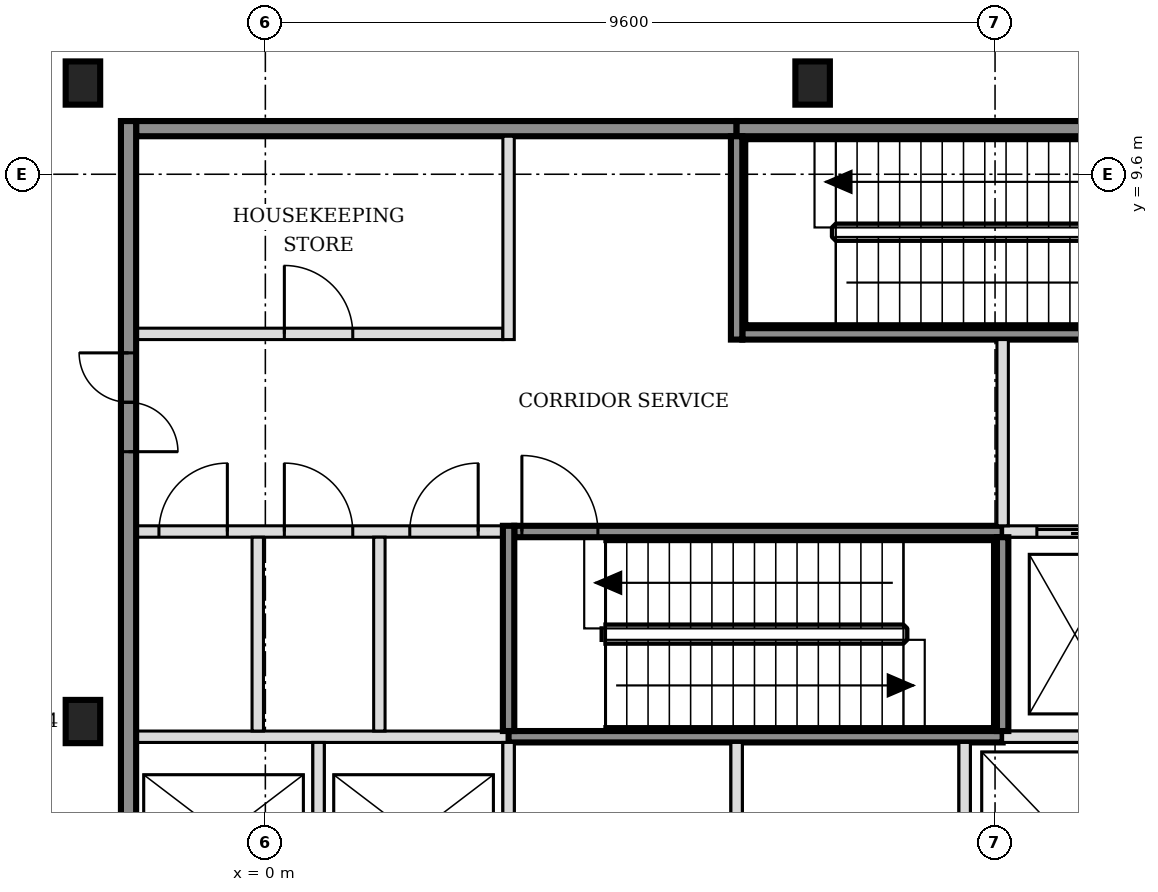
"""IFC4 building model, lengths in metres.
Left out: names, types, materials, properties, quantities, classifications, styles, units other than length and angle.
Written with IfcOpenShell. Run it as: python <this file> out.ifc"""

import sys

from ifc_helpers import new_model, si_unit, direction, frame, frame_2d, origin, origin_2d, place, context, subcontext, project, spatial, rectangle, i_section, extrude, element, fill, save


model = new_model("IFC4")
c1 = context("Model", 3, precision=1e-05, world=origin(), true_north=direction((0.0, 1.0)))
c2 = subcontext(c1, "Body", "Model", "MODEL_VIEW")
j1 = project(units=[si_unit("LENGTHUNIT", "METRE"), si_unit("PLANEANGLEUNIT", "RADIAN")], contexts=[c1])
p1 = place(None, origin())
s1 = spatial("IfcSite", under=j1, at=p1, CompositionType="ELEMENT")
p2 = place(p1, origin())
s2 = spatial("IfcBuilding", under=s1, at=p2, CompositionType="ELEMENT")
p3 = place(p2, frame((0.0, 0.0, 30.6)))
s3 = spatial("IfcBuildingStorey", under=s2, at=p3, CompositionType="ELEMENT", Elevation=30.6)
for number, where, z_axis, x_axis in (
    (1, (-2.4, 2.4, -0.2), (0.0, 0.0, 1.0), (1.0, 0.0, 0.0)),
    (2, (-2.4, 10.8, -0.2), (0.0, 0.0, 1.0), (1.0, 0.0, 0.0)),
    (3, (7.2, 10.8, -0.2), (0.0, 0.0, 1.0), (1.0, 0.0, 0.0)),
):
    element("IfcColumn", number, at=place(p3, frame(where, z_axis=z_axis, x_axis=x_axis)), inside=s3, PredefinedType="COLUMN", context=c2, shape_type="SweptSolid", body=[
        extrude(i_section(OverallWidth=0.454, OverallDepth=0.569, WebThickness=0.078, FlangeThickness=0.125, FilletRadius=0.015, at=origin_2d()), origin(), (0.0, 0.0, 1.0), 4.8),
    ])
p4 = place(p3, frame((-1.7, 2.2, 0.0), z_axis=(0.0, 0.0, 1.0), x_axis=(1.0, 0.0, 0.0)))
e4 = element("IfcWall", 4, at=p4, inside=s3, PredefinedType="SOLIDWALL", context=c2, shape_type="SweptSolid", body=[
    extrude(rectangle(XDim=4.9, YDim=0.15, at=frame_2d((2.45, 0.0))), origin(), (0.0, 0.0, 1.0), 4.6),
])
p5 = place(p3, frame((3.2, 2.2, 0.0), z_axis=(0.0, 0.0, 1.0), x_axis=(1.0, 0.0, 0.0)))
e5 = element("IfcWall", 5, at=p5, inside=s3, PredefinedType="SOLIDWALL", context=c2, shape_type="SweptSolid", body=[
    extrude(rectangle(XDim=6.5, YDim=0.15, at=frame_2d((3.25, 0.0))), origin(), (0.0, 0.0, 1.0), 4.6),
])
p6 = place(p3, frame((9.7, 2.2, 0.0), z_axis=(0.0, 0.0, 1.0), x_axis=(1.0, 0.0, 0.0)))
e6 = element("IfcWall", 6, at=p6, inside=s3, PredefinedType="SOLIDWALL", context=c2, shape_type="SweptSolid", body=[
    extrude(rectangle(XDim=4.525, YDim=0.15, at=frame_2d((2.263, 0.0))), origin(), (0.0, 0.0, 1.0), 4.6),
])
p7 = place(p3, frame((-1.7, 4.9, 0.0), z_axis=(0.0, 0.0, 1.0), x_axis=(1.0, 0.0, 0.0)))
e7 = element("IfcWall", 7, at=p7, inside=s3, PredefinedType="PARTITIONING", context=c2, shape_type="SweptSolid", body=[
    extrude(rectangle(XDim=4.825, YDim=0.15, at=frame_2d((2.413, 0.0))), origin(), (0.0, 0.0, 1.0), 4.6),
])
p8 = place(p7, frame((0.3, 0.0, 0.0)))
e8 = element("IfcOpeningElement", 8, at=p8, cuts=e7, PredefinedType="OPENING", context=c2, shape_type="SweptSolid", body=[
    extrude(rectangle(XDim=0.9, YDim=2.1, at=frame_2d((0.45, 1.05))), frame((0.0, 0.085, 0.0), z_axis=(0.0, -1.0, 0.0), x_axis=(1.0, 0.0, 0.0)), (0.0, 0.0, 1.0), 0.17),
])
p9 = place(p7, frame((1.95, 0.0, 0.0)))
e9 = element("IfcOpeningElement", 9, at=p9, cuts=e7, PredefinedType="OPENING", context=c2, shape_type="SweptSolid", body=[
    extrude(rectangle(XDim=0.9, YDim=2.1, at=frame_2d((0.45, 1.05))), frame((0.0, 0.085, 0.0), z_axis=(0.0, -1.0, 0.0), x_axis=(1.0, 0.0, 0.0)), (0.0, 0.0, 1.0), 0.17),
])
p10 = place(p7, frame((3.6, 0.0, 0.0)))
e10 = element("IfcOpeningElement", 10, at=p10, cuts=e7, PredefinedType="OPENING", context=c2, shape_type="SweptSolid", body=[
    extrude(rectangle(XDim=0.9, YDim=2.1, at=frame_2d((0.45, 1.05))), frame((0.0, 0.085, 0.0), z_axis=(0.0, -1.0, 0.0), x_axis=(1.0, 0.0, 0.0)), (0.0, 0.0, 1.0), 0.17),
])
p11 = place(p3, frame((3.275, 4.9, 0.0), z_axis=(0.0, 0.0, 1.0), x_axis=(1.0, 0.0, 0.0)))
e11 = element("IfcWall", 11, at=p11, inside=s3, PredefinedType="SOLIDWALL", context=c2, shape_type="SweptSolid", body=[
    extrude(rectangle(XDim=6.425, YDim=0.15, at=frame_2d((3.212, 0.0))), origin(), (0.0, 0.0, 1.0), 4.6),
])
p12 = place(p11, frame((0.1, 0.0, 0.0)))
e12 = element("IfcOpeningElement", 12, at=p12, cuts=e11, PredefinedType="OPENING", context=c2, shape_type="SweptSolid", body=[
    extrude(rectangle(XDim=1.0, YDim=2.1, at=frame_2d((0.5, 1.05))), frame((0.0, 0.085, 0.0), z_axis=(0.0, -1.0, 0.0), x_axis=(1.0, 0.0, 0.0)), (0.0, 0.0, 1.0), 0.17),
])
p13 = place(p3, frame((9.7, 4.9, 0.0), z_axis=(0.0, 0.0, 1.0), x_axis=(1.0, 0.0, 0.0)))
e13 = element("IfcWall", 13, at=p13, inside=s3, PredefinedType="SOLIDWALL", context=c2, shape_type="SweptSolid", body=[
    extrude(rectangle(XDim=6.4, YDim=0.15, at=frame_2d((3.2, 0.0))), origin(), (0.0, 0.0, 1.0), 4.6),
])
p14 = place(p13, frame((0.45, 0.0, 0.0)))
e14 = element("IfcOpeningElement", 14, at=p14, cuts=e13, PredefinedType="OPENING", context=c2, shape_type="SweptSolid", body=[
    extrude(rectangle(XDim=1.0, YDim=2.1, at=frame_2d((0.5, 1.05))), frame((0.0, 0.085, 0.0), z_axis=(0.0, -1.0, 0.0), x_axis=(1.0, 0.0, 0.0)), (0.0, 0.0, 1.0), 0.17),
])
p15 = place(p13, frame((2.35, 0.0, 0.0)))
e15 = element("IfcOpeningElement", 15, at=p15, cuts=e13, PredefinedType="OPENING", context=c2, shape_type="SweptSolid", body=[
    extrude(rectangle(XDim=1.0, YDim=2.1, at=frame_2d((0.5, 1.05))), frame((0.0, 0.085, 0.0), z_axis=(0.0, -1.0, 0.0), x_axis=(1.0, 0.0, 0.0)), (0.0, 0.0, 1.0), 0.17),
])
p16 = place(p13, frame((4.7, 0.0, 0.0)))
e16 = element("IfcOpeningElement", 16, at=p16, cuts=e13, PredefinedType="OPENING", context=c2, shape_type="SweptSolid", body=[
    extrude(rectangle(XDim=0.9, YDim=2.1, at=frame_2d((0.45, 1.05))), frame((0.0, 0.085, 0.0), z_axis=(0.0, -1.0, 0.0), x_axis=(1.0, 0.0, 0.0)), (0.0, 0.0, 1.0), 0.17),
])
p17 = place(p3, frame((-1.7, 7.5, 0.0), z_axis=(0.0, 0.0, 1.0), x_axis=(1.0, 0.0, 0.0)))
e17 = element("IfcWall", 17, at=p17, inside=s3, PredefinedType="PARTITIONING", context=c2, shape_type="SweptSolid", body=[
    extrude(rectangle(XDim=4.825, YDim=0.15, at=frame_2d((2.413, 0.0))), origin(), (0.0, 0.0, 1.0), 4.6),
])
p18 = place(p17, frame((1.95, 0.0, 0.0)))
e18 = element("IfcOpeningElement", 18, at=p18, cuts=e17, PredefinedType="OPENING", context=c2, shape_type="SweptSolid", body=[
    extrude(rectangle(XDim=0.9, YDim=2.1, at=frame_2d((0.45, 1.05))), frame((0.0, 0.085, 0.0), z_axis=(0.0, -1.0, 0.0), x_axis=(1.0, 0.0, 0.0)), (0.0, 0.0, 1.0), 0.17),
])
p19 = place(p3, frame((6.275, 7.5, 0.0), z_axis=(0.0, 0.0, 1.0), x_axis=(1.0, 0.0, 0.0)))
e19 = element("IfcWall", 19, at=p19, inside=s3, PredefinedType="SOLIDWALL", context=c2, shape_type="SweptSolid", body=[
    extrude(rectangle(XDim=6.425, YDim=0.15, at=frame_2d((3.212, 0.0))), origin(), (0.0, 0.0, 1.0), 4.6),
])
p20 = place(p19, frame((5.225, 0.0, 0.0)))
e20 = element("IfcOpeningElement", 20, at=p20, cuts=e19, PredefinedType="OPENING", context=c2, shape_type="SweptSolid", body=[
    extrude(rectangle(XDim=1.0, YDim=2.1, at=frame_2d((0.5, 1.05))), frame((0.0, 0.085, 0.0), z_axis=(0.0, -1.0, 0.0), x_axis=(1.0, 0.0, 0.0)), (0.0, 0.0, 1.0), 0.17),
])
p21 = place(p3, frame((-1.7, 10.2, 0.0), z_axis=(0.0, 0.0, 1.0), x_axis=(1.0, 0.0, 0.0)))
e21 = element("IfcWall", 21, at=p21, inside=s3, PredefinedType="SOLIDWALL", context=c2, shape_type="SweptSolid", body=[
    extrude(rectangle(XDim=7.9, YDim=0.2, at=frame_2d((3.95, 0.0))), origin(), (0.0, 0.0, 1.0), 4.6),
])
p22 = place(p3, frame((6.2, 10.2, 0.0), z_axis=(0.0, 0.0, 1.0), x_axis=(1.0, 0.0, 0.0)))
e22 = element("IfcWall", 22, at=p22, inside=s3, PredefinedType="SOLIDWALL", context=c2, shape_type="SweptSolid", body=[
    extrude(rectangle(XDim=6.5, YDim=0.2, at=frame_2d((3.25, 0.0))), origin(), (0.0, 0.0, 1.0), 4.6),
])
p23 = place(p3, frame((-1.8, -5.5, 0.0), z_axis=(0.0, 0.0, 1.0), x_axis=(0.0, 1.0, 0.0)))
e23 = element("IfcWall", 23, at=p23, inside=s3, PredefinedType="SOLIDWALL", context=c2, shape_type="SweptSolid", body=[
    extrude(rectangle(XDim=15.8, YDim=0.2, at=frame_2d((7.9, 0.0))), origin(), (0.0, 0.0, 1.0), 4.6),
])
p24 = place(p23, frame((3.05, 0.0, 0.0)))
e24 = element("IfcOpeningElement", 24, at=p24, cuts=e23, PredefinedType="OPENING", context=c2, shape_type="SweptSolid", body=[
    extrude(rectangle(XDim=1.3, YDim=2.1, at=frame_2d((0.65, 1.05))), frame((0.0, 0.11, 0.0), z_axis=(0.0, -1.0, 0.0), x_axis=(1.0, 0.0, 0.0)), (0.0, 0.0, 1.0), 0.22),
])
p25 = place(p23, frame((11.45, 0.0, 0.0)))
e25 = element("IfcOpeningElement", 25, at=p25, cuts=e23, PredefinedType="OPENING", context=c2, shape_type="SweptSolid", body=[
    extrude(rectangle(XDim=1.3, YDim=2.1, at=frame_2d((0.65, 1.05))), frame((0.0, 0.11, 0.0), z_axis=(0.0, -1.0, 0.0), x_axis=(1.0, 0.0, 0.0)), (0.0, 0.0, 1.0), 0.22),
])
p26 = place(p3, frame((-0.1, 2.275, 0.0), z_axis=(0.0, 0.0, 1.0), x_axis=(0.0, 1.0, 0.0)))
e26 = element("IfcWall", 26, at=p26, inside=s3, PredefinedType="PARTITIONING", context=c2, shape_type="SweptSolid", body=[
    extrude(rectangle(XDim=2.55, YDim=0.15, at=frame_2d((1.275, 0.0))), origin(), (0.0, 0.0, 1.0), 4.6),
])
p27 = place(p3, frame((0.7, -0.325, 0.0), z_axis=(0.0, 0.0, 1.0), x_axis=(0.0, 1.0, 0.0)))
e27 = element("IfcWall", 27, at=p27, inside=s3, PredefinedType="SOLIDWALL", context=c2, shape_type="SweptSolid", body=[
    extrude(rectangle(XDim=2.45, YDim=0.15, at=frame_2d((1.225, 0.0))), origin(), (0.0, 0.0, 1.0), 4.6),
])
p28 = place(p3, frame((1.5, 2.275, 0.0), z_axis=(0.0, 0.0, 1.0), x_axis=(0.0, 1.0, 0.0)))
e28 = element("IfcWall", 28, at=p28, inside=s3, PredefinedType="PARTITIONING", context=c2, shape_type="SweptSolid", body=[
    extrude(rectangle(XDim=2.55, YDim=0.15, at=frame_2d((1.275, 0.0))), origin(), (0.0, 0.0, 1.0), 4.6),
])
p29 = place(p3, frame((3.2, -0.325, 0.0), z_axis=(0.0, 0.0, 1.0), x_axis=(0.0, 1.0, 0.0)))
e29 = element("IfcWall", 29, at=p29, inside=s3, PredefinedType="SOLIDWALL", context=c2, shape_type="SweptSolid", body=[
    extrude(rectangle(XDim=2.45, YDim=0.15, at=frame_2d((1.225, 0.0))), origin(), (0.0, 0.0, 1.0), 4.6),
])
p30 = place(p3, frame((3.2, 2.275, 0.0), z_axis=(0.0, 0.0, 1.0), x_axis=(0.0, 1.0, 0.0)))
e30 = element("IfcWall", 30, at=p30, inside=s3, PredefinedType="SOLIDWALL", context=c2, shape_type="SweptSolid", body=[
    extrude(rectangle(XDim=2.7, YDim=0.15, at=frame_2d((1.35, 0.0))), origin(), (0.0, 0.0, 1.0), 4.6),
])
p31 = place(p3, frame((3.2, 7.425, 0.0), z_axis=(0.0, 0.0, 1.0), x_axis=(0.0, 1.0, 0.0)))
e31 = element("IfcWall", 31, at=p31, inside=s3, PredefinedType="PARTITIONING", context=c2, shape_type="SweptSolid", body=[
    extrude(rectangle(XDim=2.675, YDim=0.15, at=frame_2d((1.337, 0.0))), origin(), (0.0, 0.0, 1.0), 4.6),
])
p32 = place(p3, frame((6.2, -0.325, 0.0), z_axis=(0.0, 0.0, 1.0), x_axis=(0.0, 1.0, 0.0)))
e32 = element("IfcWall", 32, at=p32, inside=s3, PredefinedType="SOLIDWALL", context=c2, shape_type="SweptSolid", body=[
    extrude(rectangle(XDim=2.45, YDim=0.15, at=frame_2d((1.225, 0.0))), origin(), (0.0, 0.0, 1.0), 4.6),
])
p33 = place(p3, frame((6.2, 7.425, 0.0), z_axis=(0.0, 0.0, 1.0), x_axis=(0.0, 1.0, 0.0)))
e33 = element("IfcWall", 33, at=p33, inside=s3, PredefinedType="SOLIDWALL", context=c2, shape_type="SweptSolid", body=[
    extrude(rectangle(XDim=2.675, YDim=0.15, at=frame_2d((1.337, 0.0))), origin(), (0.0, 0.0, 1.0), 4.6),
])
p34 = place(p3, frame((9.2, -0.325, 0.0), z_axis=(0.0, 0.0, 1.0), x_axis=(0.0, 1.0, 0.0)))
e34 = element("IfcWall", 34, at=p34, inside=s3, PredefinedType="SOLIDWALL", context=c2, shape_type="SweptSolid", body=[
    extrude(rectangle(XDim=2.45, YDim=0.15, at=frame_2d((1.225, 0.0))), origin(), (0.0, 0.0, 1.0), 4.6),
])
p35 = place(p3, frame((9.7, 2.275, 0.0), z_axis=(0.0, 0.0, 1.0), x_axis=(0.0, 1.0, 0.0)))
e35 = element("IfcWall", 35, at=p35, inside=s3, PredefinedType="SOLIDWALL", context=c2, shape_type="SweptSolid", body=[
    extrude(rectangle(XDim=2.55, YDim=0.15, at=frame_2d((1.275, 0.0))), origin(), (0.0, 0.0, 1.0), 4.6),
])
p36 = place(p3, frame((9.7, 4.975, 0.0), z_axis=(0.0, 0.0, 1.0), x_axis=(0.0, 1.0, 0.0)))
e36 = element("IfcWall", 36, at=p36, inside=s3, PredefinedType="SOLIDWALL", context=c2, shape_type="SweptSolid", body=[
    extrude(rectangle(XDim=2.45, YDim=0.15, at=frame_2d((1.225, 0.0))), origin(), (0.0, 0.0, 1.0), 4.6),
])
p37 = place(p14, origin())
e37 = element("IfcDoor", 37, at=p37, inside=s3, OperationType="DOUBLE_DOOR_SLIDING", PredefinedType="DOOR", context=c2, shape_type="SweptSolid", body=[
    extrude(rectangle(XDim=1.0, YDim=2.1, at=frame_2d((0.5, 1.05))), frame((0.0, 0.025, 0.0), z_axis=(0.0, -1.0, 0.0), x_axis=(1.0, 0.0, 0.0)), (0.0, 0.0, 1.0), 0.05),
])
fill(e14, e37)
p38 = place(p12, origin())
e38 = element("IfcDoor", 38, at=p38, inside=s3, OperationType="SINGLE_SWING_LEFT", PredefinedType="DOOR", context=c2, shape_type="SweptSolid", body=[
    extrude(rectangle(XDim=1.0, YDim=2.1, at=frame_2d((0.5, 1.05))), frame((0.0, 0.025, 0.0), z_axis=(0.0, -1.0, 0.0), x_axis=(1.0, 0.0, 0.0)), (0.0, 0.0, 1.0), 0.05),
])
fill(e12, e38)
p39 = place(p25, origin())
e39 = element("IfcDoor", 39, at=p39, inside=s3, OperationType="DOUBLE_DOOR_SINGLE_SWING", PredefinedType="DOOR", context=c2, shape_type="SweptSolid", body=[
    extrude(rectangle(XDim=1.3, YDim=2.1, at=frame_2d((0.65, 1.05))), frame((0.0, 0.025, 0.0), z_axis=(0.0, -1.0, 0.0), x_axis=(1.0, 0.0, 0.0)), (0.0, 0.0, 1.0), 0.05),
])
fill(e25, e39)
p40 = place(p8, origin())
e40 = element("IfcDoor", 40, at=p40, inside=s3, OperationType="SINGLE_SWING_RIGHT", PredefinedType="DOOR", context=c2, shape_type="SweptSolid", body=[
    extrude(rectangle(XDim=0.9, YDim=2.1, at=frame_2d((0.45, 1.05))), frame((0.0, 0.025, 0.0), z_axis=(0.0, -1.0, 0.0), x_axis=(1.0, 0.0, 0.0)), (0.0, 0.0, 1.0), 0.05),
])
fill(e8, e40)
p41 = place(p9, origin())
e41 = element("IfcDoor", 41, at=p41, inside=s3, OperationType="SINGLE_SWING_LEFT", PredefinedType="DOOR", context=c2, shape_type="SweptSolid", body=[
    extrude(rectangle(XDim=0.9, YDim=2.1, at=frame_2d((0.45, 1.05))), frame((0.0, 0.025, 0.0), z_axis=(0.0, -1.0, 0.0), x_axis=(1.0, 0.0, 0.0)), (0.0, 0.0, 1.0), 0.05),
])
fill(e9, e41)
p42 = place(p10, origin())
e42 = element("IfcDoor", 42, at=p42, inside=s3, OperationType="SINGLE_SWING_RIGHT", PredefinedType="DOOR", context=c2, shape_type="SweptSolid", body=[
    extrude(rectangle(XDim=0.9, YDim=2.1, at=frame_2d((0.45, 1.05))), frame((0.0, 0.025, 0.0), z_axis=(0.0, -1.0, 0.0), x_axis=(1.0, 0.0, 0.0)), (0.0, 0.0, 1.0), 0.05),
])
fill(e10, e42)
p43 = place(p18, origin())
e43 = element("IfcDoor", 43, at=p43, inside=s3, OperationType="SINGLE_SWING_LEFT", PredefinedType="DOOR", context=c2, shape_type="SweptSolid", body=[
    extrude(rectangle(XDim=0.9, YDim=2.1, at=frame_2d((0.45, 1.05))), frame((0.0, 0.025, 0.0), z_axis=(0.0, -1.0, 0.0), x_axis=(1.0, 0.0, 0.0)), (0.0, 0.0, 1.0), 0.05),
])
fill(e18, e43)
save(model, sys.argv[1])
